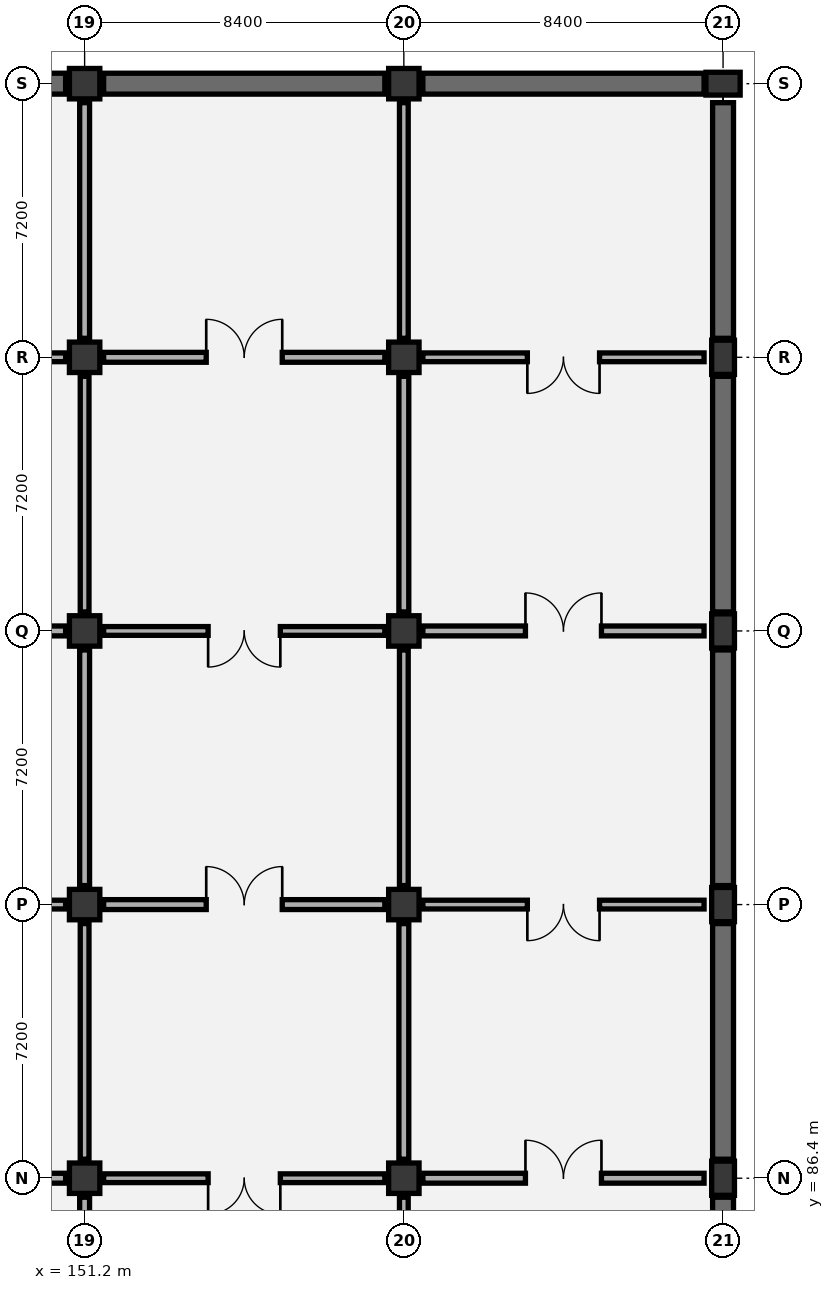
"""IFC4 building model, lengths in metres.
Left out: names, types, materials, properties, quantities, classifications, styles, units other than length and angle.
Written with IfcOpenShell. Run it as: python <this file> out.ifc"""

import sys

from ifc_helpers import new_model, si_unit, direction, frame, frame_2d, origin, origin_2d, place, context, subcontext, project, spatial, rectangle, extrude, element, fill, save


model = new_model("IFC4")
c1 = context("Model", 3, precision=1e-05, world=origin(), true_north=direction((0.0, 1.0)))
c2 = subcontext(c1, "Body", "Model", "MODEL_VIEW")
j1 = project(units=[si_unit("LENGTHUNIT", "METRE"), si_unit("PLANEANGLEUNIT", "RADIAN")], contexts=[c1])
p1 = place(None, origin())
s1 = spatial("IfcSite", under=j1, at=p1, CompositionType="ELEMENT")
p2 = place(p1, origin())
s2 = spatial("IfcBuilding", under=s1, at=p2, CompositionType="ELEMENT")
p3 = place(p2, frame((0.0, 0.0, -9.6)))
s3 = spatial("IfcBuildingStorey", under=s2, at=p3, CompositionType="ELEMENT", Elevation=-9.6)
for number, where, z_axis, x_axis in (
    (1, (151.2, 86.4, 0.0), (0.0, 0.0, 1.0), (1.0, 0.0, 0.0)),
    (2, (151.2, 93.6, 0.0), (0.0, 0.0, 1.0), (1.0, 0.0, 0.0)),
    (3, (151.2, 100.8, 0.0), (0.0, 0.0, 1.0), (1.0, 0.0, 0.0)),
    (4, (151.2, 108.0, 0.0), (0.0, 0.0, 1.0), (1.0, 0.0, 0.0)),
    (5, (151.2, 115.2, 0.0), (0.0, 0.0, 1.0), (1.0, 0.0, 0.0)),
    (6, (159.6, 86.4, 0.0), (0.0, 0.0, 1.0), (1.0, 0.0, 0.0)),
    (7, (159.6, 93.6, 0.0), (0.0, 0.0, 1.0), (1.0, 0.0, 0.0)),
    (8, (159.6, 100.8, 0.0), (0.0, 0.0, 1.0), (1.0, 0.0, 0.0)),
    (9, (159.6, 108.0, 0.0), (0.0, 0.0, 1.0), (1.0, 0.0, 0.0)),
    (10, (159.6, 115.2, 0.0), (0.0, 0.0, 1.0), (1.0, 0.0, 0.0)),
):
    element("IfcColumn", number, at=place(p3, frame(where, z_axis=z_axis, x_axis=x_axis)), inside=s3, PredefinedType="COLUMN", context=c2, shape_type="SweptSolid", body=[
        extrude(rectangle(XDim=0.8, YDim=0.8, at=origin_2d()), origin(), (0.0, 0.0, 1.0), 4.8),
    ])
for number, where, z_axis, x_axis in (
    (11, (168.0, 86.4, 0.0), (0.0, 0.0, 1.0), (1.0, 0.0, 0.0)),
    (12, (168.0, 93.6, 0.0), (0.0, 0.0, 1.0), (1.0, 0.0, 0.0)),
    (13, (168.0, 100.8, 0.0), (0.0, 0.0, 1.0), (1.0, 0.0, 0.0)),
    (14, (168.0, 108.0, 0.0), (0.0, 0.0, 1.0), (1.0, 0.0, 0.0)),
    (15, (168.0, 115.2, 0.0), (0.0, 0.0, 1.0), (0.0, 1.0, 0.0)),
):
    element("IfcColumn", number, at=place(p3, frame(where, z_axis=z_axis, x_axis=x_axis)), inside=s3, PredefinedType="COLUMN", context=c2, shape_type="SweptSolid", body=[
        extrude(rectangle(XDim=0.6, YDim=0.9, at=origin_2d()), origin(), (0.0, 0.0, 1.0), 4.8),
    ])
p4 = place(p3, frame((143.3, 115.2, 0.0), z_axis=(0.0, 0.0, 1.0), x_axis=(1.0, 0.0, 0.0)))
e16 = element("IfcWall", 16, at=p4, inside=s3, PredefinedType="USERDEFINED", context=c2, shape_type="SweptSolid", body=[
    extrude(rectangle(XDim=7.4, YDim=0.55, at=frame_2d((3.7, 0.0))), origin(), (0.0, 0.0, 1.0), 4.4),
])
p5 = place(p3, frame((151.7, 115.2, 0.0), z_axis=(0.0, 0.0, 1.0), x_axis=(1.0, 0.0, 0.0)))
e17 = element("IfcWall", 17, at=p5, inside=s3, PredefinedType="USERDEFINED", context=c2, shape_type="SweptSolid", body=[
    extrude(rectangle(XDim=7.4, YDim=0.55, at=frame_2d((3.7, 0.0))), origin(), (0.0, 0.0, 1.0), 4.4),
])
p6 = place(p3, frame((168.0, 79.7, 0.0), z_axis=(0.0, 0.0, 1.0), x_axis=(0.0, 1.0, 0.0)))
e18 = element("IfcWall", 18, at=p6, inside=s3, PredefinedType="USERDEFINED", context=c2, shape_type="SweptSolid", body=[
    extrude(rectangle(XDim=6.2, YDim=0.55, at=frame_2d((3.1, 0.0))), origin(), (0.0, 0.0, 1.0), 4.4),
])
p7 = place(p3, frame((168.0, 86.9, 0.0), z_axis=(0.0, 0.0, 1.0), x_axis=(0.0, 1.0, 0.0)))
e19 = element("IfcWall", 19, at=p7, inside=s3, PredefinedType="USERDEFINED", context=c2, shape_type="SweptSolid", body=[
    extrude(rectangle(XDim=6.2, YDim=0.55, at=frame_2d((3.1, 0.0))), origin(), (0.0, 0.0, 1.0), 4.4),
])
for number, where, z_axis, x_axis in (
    (20, (168.0, 94.1, 0.0), (0.0, 0.0, 1.0), (0.0, 1.0, 0.0)),
    (21, (168.0, 101.3, 0.0), (0.0, 0.0, 1.0), (0.0, 1.0, 0.0)),
):
    element("IfcWall", number, at=place(p3, frame(where, z_axis=z_axis, x_axis=x_axis)), inside=s3, PredefinedType="USERDEFINED", context=c2, shape_type="SweptSolid", body=[
        extrude(rectangle(XDim=6.2, YDim=0.55, at=frame_2d((3.1, 0.0))), origin(), (0.0, 0.0, 1.0), 4.4),
    ])
p8 = place(p3, frame((160.1, 115.2, 0.0), z_axis=(0.0, 0.0, 1.0), x_axis=(1.0, 0.0, 0.0)))
e22 = element("IfcWall", 22, at=p8, inside=s3, PredefinedType="USERDEFINED", context=c2, shape_type="SweptSolid", body=[
    extrude(rectangle(XDim=7.4, YDim=0.55, at=frame_2d((3.7, 0.0))), origin(), (0.0, 0.0, 1.0), 4.4),
])
p9 = place(p3, frame((168.0, 108.5, 0.0), z_axis=(0.0, 0.0, 1.0), x_axis=(0.0, 1.0, 0.0)))
e23 = element("IfcWall", 23, at=p9, inside=s3, PredefinedType="USERDEFINED", context=c2, shape_type="SweptSolid", body=[
    extrude(rectangle(XDim=6.2, YDim=0.55, at=frame_2d((3.1, 0.0))), origin(), (0.0, 0.0, 1.0), 4.4),
])
p10 = place(p3, frame((151.2, 79.7, 0.0), z_axis=(0.0, 0.0, 1.0), x_axis=(0.0, 1.0, 0.0)))
e24 = element("IfcWall", 24, at=p10, inside=s3, PredefinedType="PARTITIONING", context=c2, shape_type="SweptSolid", body=[
    extrude(rectangle(XDim=6.2, YDim=0.26, at=frame_2d((3.1, 0.0))), origin(), (0.0, 0.0, 1.0), 3.595),
])
p11 = place(p10, frame((2.1, 0.0, 0.0)))
e25 = element("IfcOpeningElement", 25, at=p11, cuts=e24, PredefinedType="OPENING", context=c2, shape_type="SweptSolid", body=[
    extrude(rectangle(XDim=2.0, YDim=2.35, at=frame_2d((1.0, 1.175))), frame((0.0, 0.14, 0.0), z_axis=(0.0, -1.0, 0.0), x_axis=(1.0, 0.0, 0.0)), (0.0, 0.0, 1.0), 0.28),
])
p12 = place(p3, frame((143.3, 86.4, 0.0), z_axis=(0.0, 0.0, 1.0), x_axis=(1.0, 0.0, 0.0)))
e26 = element("IfcWall", 26, at=p12, inside=s3, PredefinedType="PARTITIONING", context=c2, shape_type="SweptSolid", body=[
    extrude(rectangle(XDim=7.4, YDim=0.26, at=frame_2d((3.7, 0.0))), origin(), (0.0, 0.0, 1.0), 3.495),
])
p13 = place(p12, frame((2.75, 0.0, 0.0)))
e27 = element("IfcOpeningElement", 27, at=p13, cuts=e26, PredefinedType="OPENING", context=c2, shape_type="SweptSolid", body=[
    extrude(rectangle(XDim=1.9, YDim=2.3, at=frame_2d((0.95, 1.15))), frame((0.0, 0.14, 0.0), z_axis=(0.0, -1.0, 0.0), x_axis=(1.0, 0.0, 0.0)), (0.0, 0.0, 1.0), 0.28),
])
p14 = place(p3, frame((151.2, 86.9, 0.0), z_axis=(0.0, 0.0, 1.0), x_axis=(0.0, 1.0, 0.0)))
e28 = element("IfcWall", 28, at=p14, inside=s3, PredefinedType="PARTITIONING", context=c2, shape_type="SweptSolid", body=[
    extrude(rectangle(XDim=6.2, YDim=0.23, at=frame_2d((3.1, 0.0))), origin(), (0.0, 0.0, 1.0), 3.595),
])
p15 = place(p3, frame((143.3, 93.6, 0.0), z_axis=(0.0, 0.0, 1.0), x_axis=(1.0, 0.0, 0.0)))
e29 = element("IfcWall", 29, at=p15, inside=s3, PredefinedType="PARTITIONING", context=c2, shape_type="SweptSolid", body=[
    extrude(rectangle(XDim=7.4, YDim=0.23, at=frame_2d((3.7, 0.0))), origin(), (0.0, 0.0, 1.0), 3.495),
])
p16 = place(p15, frame((2.7, 0.0, 0.0)))
e30 = element("IfcOpeningElement", 30, at=p16, cuts=e29, PredefinedType="OPENING", context=c2, shape_type="SweptSolid", body=[
    extrude(rectangle(XDim=2.0, YDim=2.35, at=frame_2d((1.0, 1.175))), frame((0.0, 0.125, 0.0), z_axis=(0.0, -1.0, 0.0), x_axis=(1.0, 0.0, 0.0)), (0.0, 0.0, 1.0), 0.25),
])
p17 = place(p3, frame((151.2, 94.1, 0.0), z_axis=(0.0, 0.0, 1.0), x_axis=(0.0, 1.0, 0.0)))
e31 = element("IfcWall", 31, at=p17, inside=s3, PredefinedType="PARTITIONING", context=c2, shape_type="SweptSolid", body=[
    extrude(rectangle(XDim=6.2, YDim=0.26, at=frame_2d((3.1, 0.0))), origin(), (0.0, 0.0, 1.0), 3.595),
])
p18 = place(p3, frame((143.3, 100.8, 0.0), z_axis=(0.0, 0.0, 1.0), x_axis=(1.0, 0.0, 0.0)))
e32 = element("IfcWall", 32, at=p18, inside=s3, PredefinedType="PARTITIONING", context=c2, shape_type="SweptSolid", body=[
    extrude(rectangle(XDim=7.4, YDim=0.26, at=frame_2d((3.7, 0.0))), origin(), (0.0, 0.0, 1.0), 3.495),
])
p19 = place(p18, frame((2.75, 0.0, 0.0)))
e33 = element("IfcOpeningElement", 33, at=p19, cuts=e32, PredefinedType="OPENING", context=c2, shape_type="SweptSolid", body=[
    extrude(rectangle(XDim=1.9, YDim=2.3, at=frame_2d((0.95, 1.15))), frame((0.0, 0.14, 0.0), z_axis=(0.0, -1.0, 0.0), x_axis=(1.0, 0.0, 0.0)), (0.0, 0.0, 1.0), 0.28),
])
p20 = place(p3, frame((151.2, 101.3, 0.0), z_axis=(0.0, 0.0, 1.0), x_axis=(0.0, 1.0, 0.0)))
e34 = element("IfcWall", 34, at=p20, inside=s3, PredefinedType="PARTITIONING", context=c2, shape_type="SweptSolid", body=[
    extrude(rectangle(XDim=6.2, YDim=0.23, at=frame_2d((3.1, 0.0))), origin(), (0.0, 0.0, 1.0), 3.595),
])
p21 = place(p3, frame((143.3, 108.0, 0.0), z_axis=(0.0, 0.0, 1.0), x_axis=(1.0, 0.0, 0.0)))
e35 = element("IfcWall", 35, at=p21, inside=s3, PredefinedType="PARTITIONING", context=c2, shape_type="SweptSolid", body=[
    extrude(rectangle(XDim=7.4, YDim=0.23, at=frame_2d((3.7, 0.0))), origin(), (0.0, 0.0, 1.0), 3.495),
])
p22 = place(p21, frame((2.7, 0.0, 0.0)))
e36 = element("IfcOpeningElement", 36, at=p22, cuts=e35, PredefinedType="OPENING", context=c2, shape_type="SweptSolid", body=[
    extrude(rectangle(XDim=2.0, YDim=2.35, at=frame_2d((1.0, 1.175))), frame((0.0, 0.125, 0.0), z_axis=(0.0, -1.0, 0.0), x_axis=(1.0, 0.0, 0.0)), (0.0, 0.0, 1.0), 0.25),
])
p23 = place(p3, frame((151.2, 108.5, 0.0), z_axis=(0.0, 0.0, 1.0), x_axis=(0.0, 1.0, 0.0)))
e37 = element("IfcWall", 37, at=p23, inside=s3, PredefinedType="PARTITIONING", context=c2, shape_type="SweptSolid", body=[
    extrude(rectangle(XDim=6.2, YDim=0.26, at=frame_2d((3.1, 0.0))), origin(), (0.0, 0.0, 1.0), 3.595),
])
p24 = place(p3, frame((159.6, 79.7, 0.0), z_axis=(0.0, 0.0, 1.0), x_axis=(0.0, 1.0, 0.0)))
e38 = element("IfcWall", 38, at=p24, inside=s3, PredefinedType="PARTITIONING", context=c2, shape_type="SweptSolid", body=[
    extrude(rectangle(XDim=6.2, YDim=0.23, at=frame_2d((3.1, 0.0))), origin(), (0.0, 0.0, 1.0), 3.595),
])
p25 = place(p24, frame((2.1, 0.0, 0.0)))
e39 = element("IfcOpeningElement", 39, at=p25, cuts=e38, PredefinedType="OPENING", context=c2, shape_type="SweptSolid", body=[
    extrude(rectangle(XDim=2.0, YDim=2.35, at=frame_2d((1.0, 1.175))), frame((0.0, 0.125, 0.0), z_axis=(0.0, -1.0, 0.0), x_axis=(1.0, 0.0, 0.0)), (0.0, 0.0, 1.0), 0.25),
])
p26 = place(p3, frame((151.7, 86.4, 0.0), z_axis=(0.0, 0.0, 1.0), x_axis=(1.0, 0.0, 0.0)))
e40 = element("IfcWall", 40, at=p26, inside=s3, PredefinedType="PARTITIONING", context=c2, shape_type="SweptSolid", body=[
    extrude(rectangle(XDim=7.4, YDim=0.23, at=frame_2d((3.7, 0.0))), origin(), (0.0, 0.0, 1.0), 3.495),
])
p27 = place(p26, frame((2.75, 0.0, 0.0)))
e41 = element("IfcOpeningElement", 41, at=p27, cuts=e40, PredefinedType="OPENING", context=c2, shape_type="SweptSolid", body=[
    extrude(rectangle(XDim=1.9, YDim=2.3, at=frame_2d((0.95, 1.15))), frame((0.0, 0.125, 0.0), z_axis=(0.0, -1.0, 0.0), x_axis=(1.0, 0.0, 0.0)), (0.0, 0.0, 1.0), 0.25),
])
p28 = place(p3, frame((159.6, 86.9, 0.0), z_axis=(0.0, 0.0, 1.0), x_axis=(0.0, 1.0, 0.0)))
e42 = element("IfcWall", 42, at=p28, inside=s3, PredefinedType="PARTITIONING", context=c2, shape_type="SweptSolid", body=[
    extrude(rectangle(XDim=6.2, YDim=0.26, at=frame_2d((3.1, 0.0))), origin(), (0.0, 0.0, 1.0), 3.595),
])
p29 = place(p3, frame((151.7, 93.6, 0.0), z_axis=(0.0, 0.0, 1.0), x_axis=(1.0, 0.0, 0.0)))
e43 = element("IfcWall", 43, at=p29, inside=s3, PredefinedType="PARTITIONING", context=c2, shape_type="SweptSolid", body=[
    extrude(rectangle(XDim=7.4, YDim=0.26, at=frame_2d((3.7, 0.0))), origin(), (0.0, 0.0, 1.0), 3.495),
])
p30 = place(p29, frame((2.7, 0.0, 0.0)))
e44 = element("IfcOpeningElement", 44, at=p30, cuts=e43, PredefinedType="OPENING", context=c2, shape_type="SweptSolid", body=[
    extrude(rectangle(XDim=2.0, YDim=2.35, at=frame_2d((1.0, 1.175))), frame((0.0, 0.14, 0.0), z_axis=(0.0, -1.0, 0.0), x_axis=(1.0, 0.0, 0.0)), (0.0, 0.0, 1.0), 0.28),
])
p31 = place(p3, frame((159.6, 94.1, 0.0), z_axis=(0.0, 0.0, 1.0), x_axis=(0.0, 1.0, 0.0)))
e45 = element("IfcWall", 45, at=p31, inside=s3, PredefinedType="PARTITIONING", context=c2, shape_type="SweptSolid", body=[
    extrude(rectangle(XDim=6.2, YDim=0.23, at=frame_2d((3.1, 0.0))), origin(), (0.0, 0.0, 1.0), 3.595),
])
p32 = place(p3, frame((151.7, 100.8, 0.0), z_axis=(0.0, 0.0, 1.0), x_axis=(1.0, 0.0, 0.0)))
e46 = element("IfcWall", 46, at=p32, inside=s3, PredefinedType="PARTITIONING", context=c2, shape_type="SweptSolid", body=[
    extrude(rectangle(XDim=7.4, YDim=0.23, at=frame_2d((3.7, 0.0))), origin(), (0.0, 0.0, 1.0), 3.495),
])
p33 = place(p32, frame((2.75, 0.0, 0.0)))
e47 = element("IfcOpeningElement", 47, at=p33, cuts=e46, PredefinedType="OPENING", context=c2, shape_type="SweptSolid", body=[
    extrude(rectangle(XDim=1.9, YDim=2.3, at=frame_2d((0.95, 1.15))), frame((0.0, 0.125, 0.0), z_axis=(0.0, -1.0, 0.0), x_axis=(1.0, 0.0, 0.0)), (0.0, 0.0, 1.0), 0.25),
])
p34 = place(p3, frame((159.6, 101.3, 0.0), z_axis=(0.0, 0.0, 1.0), x_axis=(0.0, 1.0, 0.0)))
e48 = element("IfcWall", 48, at=p34, inside=s3, PredefinedType="PARTITIONING", context=c2, shape_type="SweptSolid", body=[
    extrude(rectangle(XDim=6.2, YDim=0.26, at=frame_2d((3.1, 0.0))), origin(), (0.0, 0.0, 1.0), 3.595),
])
p35 = place(p3, frame((151.7, 108.0, 0.0), z_axis=(0.0, 0.0, 1.0), x_axis=(1.0, 0.0, 0.0)))
e49 = element("IfcWall", 49, at=p35, inside=s3, PredefinedType="PARTITIONING", context=c2, shape_type="SweptSolid", body=[
    extrude(rectangle(XDim=7.4, YDim=0.26, at=frame_2d((3.7, 0.0))), origin(), (0.0, 0.0, 1.0), 3.495),
])
p36 = place(p35, frame((2.7, 0.0, 0.0)))
e50 = element("IfcOpeningElement", 50, at=p36, cuts=e49, PredefinedType="OPENING", context=c2, shape_type="SweptSolid", body=[
    extrude(rectangle(XDim=2.0, YDim=2.35, at=frame_2d((1.0, 1.175))), frame((0.0, 0.14, 0.0), z_axis=(0.0, -1.0, 0.0), x_axis=(1.0, 0.0, 0.0)), (0.0, 0.0, 1.0), 0.28),
])
p37 = place(p3, frame((159.6, 108.5, 0.0), z_axis=(0.0, 0.0, 1.0), x_axis=(0.0, 1.0, 0.0)))
e51 = element("IfcWall", 51, at=p37, inside=s3, PredefinedType="PARTITIONING", context=c2, shape_type="SweptSolid", body=[
    extrude(rectangle(XDim=6.2, YDim=0.23, at=frame_2d((3.1, 0.0))), origin(), (0.0, 0.0, 1.0), 3.595),
])
p38 = place(p3, frame((160.1, 86.4, 0.0), z_axis=(0.0, 0.0, 1.0), x_axis=(1.0, 0.0, 0.0)))
e52 = element("IfcWall", 52, at=p38, inside=s3, PredefinedType="PARTITIONING", context=c2, shape_type="SweptSolid", body=[
    extrude(rectangle(XDim=7.4, YDim=0.26, at=frame_2d((3.7, 0.0))), origin(), (0.0, 0.0, 1.0), 3.495),
])
p39 = place(p38, frame((2.7, 0.0, 0.0)))
e53 = element("IfcOpeningElement", 53, at=p39, cuts=e52, PredefinedType="OPENING", context=c2, shape_type="SweptSolid", body=[
    extrude(rectangle(XDim=2.0, YDim=2.35, at=frame_2d((1.0, 1.175))), frame((0.0, 0.14, 0.0), z_axis=(0.0, -1.0, 0.0), x_axis=(1.0, 0.0, 0.0)), (0.0, 0.0, 1.0), 0.28),
])
p40 = place(p3, frame((160.1, 93.6, 0.0), z_axis=(0.0, 0.0, 1.0), x_axis=(1.0, 0.0, 0.0)))
e54 = element("IfcWall", 54, at=p40, inside=s3, PredefinedType="PARTITIONING", context=c2, shape_type="SweptSolid", body=[
    extrude(rectangle(XDim=7.4, YDim=0.23, at=frame_2d((3.7, 0.0))), origin(), (0.0, 0.0, 1.0), 3.495),
])
p41 = place(p40, frame((2.75, 0.0, 0.0)))
e55 = element("IfcOpeningElement", 55, at=p41, cuts=e54, PredefinedType="OPENING", context=c2, shape_type="SweptSolid", body=[
    extrude(rectangle(XDim=1.9, YDim=2.3, at=frame_2d((0.95, 1.15))), frame((0.0, 0.125, 0.0), z_axis=(0.0, -1.0, 0.0), x_axis=(1.0, 0.0, 0.0)), (0.0, 0.0, 1.0), 0.25),
])
p42 = place(p3, frame((160.1, 100.8, 0.0), z_axis=(0.0, 0.0, 1.0), x_axis=(1.0, 0.0, 0.0)))
e56 = element("IfcWall", 56, at=p42, inside=s3, PredefinedType="PARTITIONING", context=c2, shape_type="SweptSolid", body=[
    extrude(rectangle(XDim=7.4, YDim=0.26, at=frame_2d((3.7, 0.0))), origin(), (0.0, 0.0, 1.0), 3.495),
])
p43 = place(p42, frame((2.7, 0.0, 0.0)))
e57 = element("IfcOpeningElement", 57, at=p43, cuts=e56, PredefinedType="OPENING", context=c2, shape_type="SweptSolid", body=[
    extrude(rectangle(XDim=2.0, YDim=2.35, at=frame_2d((1.0, 1.175))), frame((0.0, 0.14, 0.0), z_axis=(0.0, -1.0, 0.0), x_axis=(1.0, 0.0, 0.0)), (0.0, 0.0, 1.0), 0.28),
])
p44 = place(p3, frame((160.1, 108.0, 0.0), z_axis=(0.0, 0.0, 1.0), x_axis=(1.0, 0.0, 0.0)))
e58 = element("IfcWall", 58, at=p44, inside=s3, PredefinedType="PARTITIONING", context=c2, shape_type="SweptSolid", body=[
    extrude(rectangle(XDim=7.4, YDim=0.23, at=frame_2d((3.7, 0.0))), origin(), (0.0, 0.0, 1.0), 3.495),
])
p45 = place(p44, frame((2.75, 0.0, 0.0)))
e59 = element("IfcOpeningElement", 59, at=p45, cuts=e58, PredefinedType="OPENING", context=c2, shape_type="SweptSolid", body=[
    extrude(rectangle(XDim=1.9, YDim=2.3, at=frame_2d((0.95, 1.15))), frame((0.0, 0.125, 0.0), z_axis=(0.0, -1.0, 0.0), x_axis=(1.0, 0.0, 0.0)), (0.0, 0.0, 1.0), 0.25),
])
p46 = place(p27, frame((1.9, 0.0, 0.0), z_axis=(0.0, 0.0, 1.0), x_axis=(-1.0, 0.0, 0.0)))
e60 = element("IfcDoor", 60, at=p46, inside=s3, OperationType="DOUBLE_DOOR_SINGLE_SWING", PredefinedType="DOOR", context=c2, shape_type="SweptSolid", body=[
    extrude(rectangle(XDim=1.9, YDim=2.3, at=frame_2d((0.95, 1.15))), frame((0.0, 0.025, 0.0), z_axis=(0.0, -1.0, 0.0), x_axis=(1.0, 0.0, 0.0)), (0.0, 0.0, 1.0), 0.05),
])
fill(e41, e60)
p47 = place(p30, origin())
e61 = element("IfcDoor", 61, at=p47, inside=s3, OperationType="DOUBLE_DOOR_SINGLE_SWING", PredefinedType="DOOR", context=c2, shape_type="SweptSolid", body=[
    extrude(rectangle(XDim=2.0, YDim=2.35, at=frame_2d((1.0, 1.175))), frame((0.0, 0.025, 0.0), z_axis=(0.0, -1.0, 0.0), x_axis=(1.0, 0.0, 0.0)), (0.0, 0.0, 1.0), 0.05),
])
fill(e44, e61)
p48 = place(p33, frame((1.9, 0.0, 0.0), z_axis=(0.0, 0.0, 1.0), x_axis=(-1.0, 0.0, 0.0)))
e62 = element("IfcDoor", 62, at=p48, inside=s3, OperationType="DOUBLE_DOOR_SINGLE_SWING", PredefinedType="DOOR", context=c2, shape_type="SweptSolid", body=[
    extrude(rectangle(XDim=1.9, YDim=2.3, at=frame_2d((0.95, 1.15))), frame((0.0, 0.025, 0.0), z_axis=(0.0, -1.0, 0.0), x_axis=(1.0, 0.0, 0.0)), (0.0, 0.0, 1.0), 0.05),
])
fill(e47, e62)
p49 = place(p36, origin())
e63 = element("IfcDoor", 63, at=p49, inside=s3, OperationType="DOUBLE_DOOR_SINGLE_SWING", PredefinedType="DOOR", context=c2, shape_type="SweptSolid", body=[
    extrude(rectangle(XDim=2.0, YDim=2.35, at=frame_2d((1.0, 1.175))), frame((0.0, 0.025, 0.0), z_axis=(0.0, -1.0, 0.0), x_axis=(1.0, 0.0, 0.0)), (0.0, 0.0, 1.0), 0.05),
])
fill(e50, e63)
p50 = place(p39, origin())
e64 = element("IfcDoor", 64, at=p50, inside=s3, OperationType="DOUBLE_DOOR_SINGLE_SWING", PredefinedType="DOOR", context=c2, shape_type="SweptSolid", body=[
    extrude(rectangle(XDim=2.0, YDim=2.35, at=frame_2d((1.0, 1.175))), frame((0.0, 0.025, 0.0), z_axis=(0.0, -1.0, 0.0), x_axis=(1.0, 0.0, 0.0)), (0.0, 0.0, 1.0), 0.05),
])
fill(e53, e64)
p51 = place(p41, frame((1.9, 0.0, 0.0), z_axis=(0.0, 0.0, 1.0), x_axis=(-1.0, 0.0, 0.0)))
e65 = element("IfcDoor", 65, at=p51, inside=s3, OperationType="DOUBLE_DOOR_SINGLE_SWING", PredefinedType="DOOR", context=c2, shape_type="SweptSolid", body=[
    extrude(rectangle(XDim=1.9, YDim=2.3, at=frame_2d((0.95, 1.15))), frame((0.0, 0.025, 0.0), z_axis=(0.0, -1.0, 0.0), x_axis=(1.0, 0.0, 0.0)), (0.0, 0.0, 1.0), 0.05),
])
fill(e55, e65)
p52 = place(p43, origin())
e66 = element("IfcDoor", 66, at=p52, inside=s3, OperationType="DOUBLE_DOOR_SINGLE_SWING", PredefinedType="DOOR", context=c2, shape_type="SweptSolid", body=[
    extrude(rectangle(XDim=2.0, YDim=2.35, at=frame_2d((1.0, 1.175))), frame((0.0, 0.025, 0.0), z_axis=(0.0, -1.0, 0.0), x_axis=(1.0, 0.0, 0.0)), (0.0, 0.0, 1.0), 0.05),
])
fill(e57, e66)
p53 = place(p45, frame((1.9, 0.0, 0.0), z_axis=(0.0, 0.0, 1.0), x_axis=(-1.0, 0.0, 0.0)))
e67 = element("IfcDoor", 67, at=p53, inside=s3, OperationType="DOUBLE_DOOR_SINGLE_SWING", PredefinedType="DOOR", context=c2, shape_type="SweptSolid", body=[
    extrude(rectangle(XDim=1.9, YDim=2.3, at=frame_2d((0.95, 1.15))), frame((0.0, 0.025, 0.0), z_axis=(0.0, -1.0, 0.0), x_axis=(1.0, 0.0, 0.0)), (0.0, 0.0, 1.0), 0.05),
])
fill(e59, e67)
save(model, sys.argv[1])
